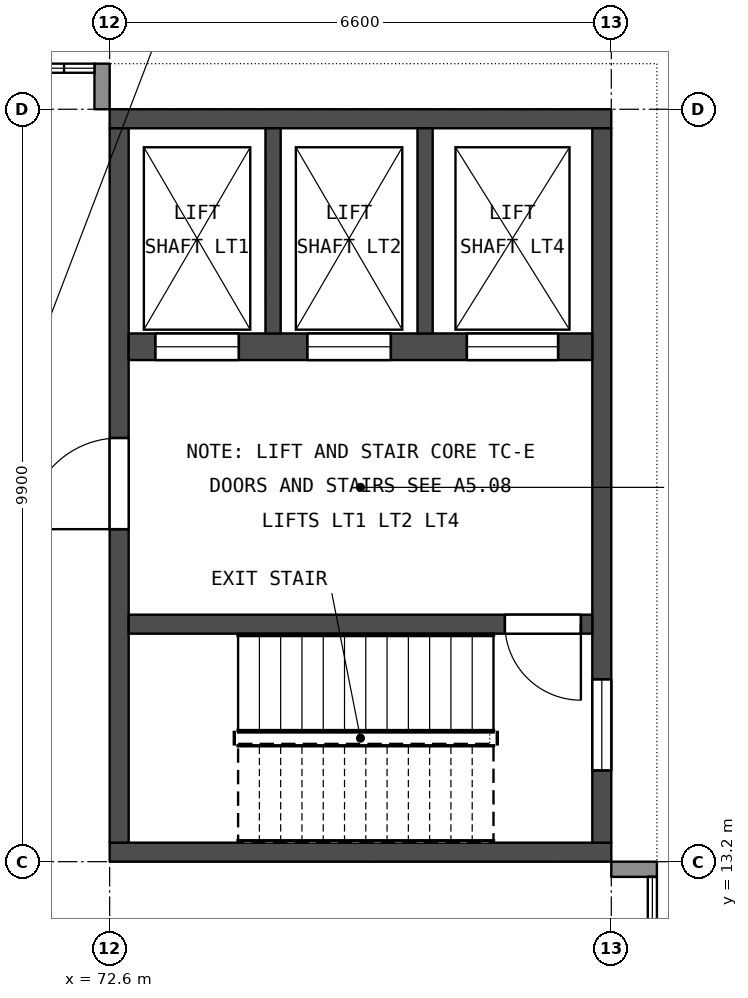
"""IFC4 building model, lengths in metres.
Left out: names, types, materials, properties, quantities, classifications, styles, units other than length and angle.
Written with IfcOpenShell. Run it as: python <this file> out.ifc"""

import sys

from ifc_helpers import new_model, si_unit, direction, frame, frame_2d, origin, place, context, subcontext, project, spatial, rectangle, extrude, element, fill, save


model = new_model("IFC4")
c1 = context("Model", 3, precision=1e-05, world=origin(), true_north=direction((0.0, 1.0)))
c2 = subcontext(c1, "Body", "Model", "MODEL_VIEW")
j1 = project(units=[si_unit("LENGTHUNIT", "METRE"), si_unit("PLANEANGLEUNIT", "RADIAN")], contexts=[c1])
p1 = place(None, origin())
s1 = spatial("IfcSite", under=j1, at=p1, CompositionType="ELEMENT")
p2 = place(p1, origin())
s2 = spatial("IfcBuilding", under=s1, at=p2, CompositionType="ELEMENT")
p3 = place(p2, frame((0.0, 0.0, 32.4)))
s3 = spatial("IfcBuildingStorey", under=s2, at=p3, CompositionType="ELEMENT", Elevation=32.4)
for number, where, z_axis, x_axis in (
    (1, (72.6, 13.325, 0.0), (0.0, 0.0, 1.0), (1.0, 0.0, 0.0)),
    (2, (72.6, 22.975, 0.0), (0.0, 0.0, 1.0), (1.0, 0.0, 0.0)),
):
    element("IfcWall", number, at=place(p3, frame(where, z_axis=z_axis, x_axis=x_axis)), inside=s3, PredefinedType="SHEAR", context=c2, shape_type="SweptSolid", body=[
        extrude(rectangle(XDim=6.6, YDim=0.25, at=frame_2d((3.3, 0.0))), origin(), (0.0, 0.0, 1.0), 4.2),
    ])
p4 = place(p3, frame((72.725, 13.45, 0.0), z_axis=(0.0, 0.0, 1.0), x_axis=(0.0, 1.0, 0.0)))
e3 = element("IfcWall", 3, at=p4, inside=s3, PredefinedType="SHEAR", context=c2, shape_type="SweptSolid", body=[
    extrude(rectangle(XDim=9.4, YDim=0.25, at=frame_2d((4.7, 0.0))), origin(), (0.0, 0.0, 1.0), 4.2),
])
p5 = place(p4, frame((4.125, 0.0, 0.0)))
e4 = element("IfcOpeningElement", 4, at=p5, cuts=e3, PredefinedType="OPENING", context=c2, shape_type="SweptSolid", body=[
    extrude(rectangle(XDim=1.2, YDim=2.1, at=frame_2d((0.6, 1.05))), frame((0.0, 0.135, 0.0), z_axis=(0.0, -1.0, 0.0), x_axis=(1.0, 0.0, 0.0)), (0.0, 0.0, 1.0), 0.27),
])
p6 = place(p3, frame((79.075, 13.45, 0.0), z_axis=(0.0, 0.0, 1.0), x_axis=(0.0, 1.0, 0.0)))
e5 = element("IfcWall", 5, at=p6, inside=s3, PredefinedType="SHEAR", context=c2, shape_type="SweptSolid", body=[
    extrude(rectangle(XDim=9.4, YDim=0.25, at=frame_2d((4.7, 0.0))), origin(), (0.0, 0.0, 1.0), 4.2),
])
p7 = place(p6, frame((0.95, 0.0, 0.7)))
e6 = element("IfcOpeningElement", 6, at=p7, cuts=e5, PredefinedType="OPENING", context=c2, shape_type="SweptSolid", body=[
    extrude(rectangle(XDim=1.2, YDim=1.8, at=frame_2d((0.6, 0.9))), frame((0.0, 0.135, 0.0), z_axis=(0.0, -1.0, 0.0), x_axis=(1.0, 0.0, 0.0)), (0.0, 0.0, 1.0), 0.27),
])
p8 = place(p3, frame((72.85, 16.325, 0.0), z_axis=(0.0, 0.0, 1.0), x_axis=(1.0, 0.0, 0.0)))
e7 = element("IfcWall", 7, at=p8, inside=s3, PredefinedType="SHEAR", context=c2, shape_type="SweptSolid", body=[
    extrude(rectangle(XDim=6.1, YDim=0.25, at=frame_2d((3.05, 0.0))), origin(), (0.0, 0.0, 1.0), 4.2),
])
p9 = place(p8, frame((4.95, 0.0, 0.0)))
e8 = element("IfcOpeningElement", 8, at=p9, cuts=e7, PredefinedType="OPENING", context=c2, shape_type="SweptSolid", body=[
    extrude(rectangle(XDim=1.0, YDim=2.2, at=frame_2d((0.5, 1.1))), frame((0.0, 0.135, 0.0), z_axis=(0.0, -1.0, 0.0), x_axis=(1.0, 0.0, 0.0)), (0.0, 0.0, 1.0), 0.27),
])
p10 = place(p3, frame((72.85, 19.975, 0.0), z_axis=(0.0, 0.0, 1.0), x_axis=(1.0, 0.0, 0.0)))
e9 = element("IfcWall", 9, at=p10, inside=s3, PredefinedType="SHEAR", context=c2, shape_type="SweptSolid", body=[
    extrude(rectangle(XDim=6.1, YDim=0.35, at=frame_2d((3.05, 0.0))), origin(), (0.0, 0.0, 1.0), 4.2),
])
p11 = place(p10, frame((0.35, 0.0, 0.0)))
e10 = element("IfcOpeningElement", 10, at=p11, cuts=e9, PredefinedType="OPENING", context=c2, shape_type="SweptSolid", body=[
    extrude(rectangle(XDim=1.1, YDim=2.2, at=frame_2d((0.55, 1.1))), frame((0.0, 0.185, 0.0), z_axis=(0.0, -1.0, 0.0), x_axis=(1.0, 0.0, 0.0)), (0.0, 0.0, 1.0), 0.37),
])
p12 = place(p10, frame((2.35, 0.0, 0.0)))
e11 = element("IfcOpeningElement", 11, at=p12, cuts=e9, PredefinedType="OPENING", context=c2, shape_type="SweptSolid", body=[
    extrude(rectangle(XDim=1.1, YDim=2.2, at=frame_2d((0.55, 1.1))), frame((0.0, 0.185, 0.0), z_axis=(0.0, -1.0, 0.0), x_axis=(1.0, 0.0, 0.0)), (0.0, 0.0, 1.0), 0.37),
])
p13 = place(p10, frame((4.45, 0.0, 0.0)))
e12 = element("IfcOpeningElement", 12, at=p13, cuts=e9, PredefinedType="OPENING", context=c2, shape_type="SweptSolid", body=[
    extrude(rectangle(XDim=1.2, YDim=2.3, at=frame_2d((0.6, 1.15))), frame((0.0, 0.185, 0.0), z_axis=(0.0, -1.0, 0.0), x_axis=(1.0, 0.0, 0.0)), (0.0, 0.0, 1.0), 0.37),
])
for number, where, z_axis, x_axis in (
    (13, (74.75, 20.15, 0.0), (0.0, 0.0, 1.0), (0.0, 1.0, 0.0)),
    (14, (76.75, 20.15, 0.0), (0.0, 0.0, 1.0), (0.0, 1.0, 0.0)),
):
    element("IfcWall", number, at=place(p3, frame(where, z_axis=z_axis, x_axis=x_axis)), inside=s3, PredefinedType="SHEAR", context=c2, shape_type="SweptSolid", body=[
        extrude(rectangle(XDim=2.7, YDim=0.2, at=frame_2d((1.35, 0.0))), origin(), (0.0, 0.0, 1.0), 4.2),
    ])
p14 = place(p3, frame((79.2, 13.1, 0.0), z_axis=(0.0, 0.0, 1.0), x_axis=(1.0, 0.0, 0.0)))
e15 = element("IfcWall", 15, at=p14, inside=s3, PredefinedType="STANDARD", context=c2, shape_type="SweptSolid", body=[
    extrude(rectangle(XDim=0.6, YDim=0.2, at=frame_2d((0.3, 0.0))), origin(), (0.0, 0.0, 1.0), 3.55),
])
p15 = place(p3, frame((72.5, 23.1, 0.0), z_axis=(0.0, 0.0, 1.0), x_axis=(0.0, 1.0, 0.0)))
e16 = element("IfcWall", 16, at=p15, inside=s3, PredefinedType="STANDARD", context=c2, shape_type="SweptSolid", body=[
    extrude(rectangle(XDim=0.6, YDim=0.2, at=frame_2d((0.3, 0.0))), origin(), (0.0, 0.0, 1.0), 3.55),
])
p16 = place(p5, origin())
e17 = element("IfcDoor", 17, at=p16, inside=s3, OperationType="SINGLE_SWING_LEFT", PredefinedType="DOOR", context=c2, shape_type="SweptSolid", body=[
    extrude(rectangle(XDim=1.2, YDim=2.1, at=frame_2d((0.6, 1.05))), frame((0.0, 0.025, 0.0), z_axis=(0.0, -1.0, 0.0), x_axis=(1.0, 0.0, 0.0)), (0.0, 0.0, 1.0), 0.05),
])
fill(e4, e17)
p17 = place(p9, origin())
e18 = element("IfcDoor", 18, at=p17, inside=s3, OperationType="SINGLE_SWING_RIGHT", PredefinedType="DOOR", context=c2, shape_type="SweptSolid", body=[
    extrude(rectangle(XDim=1.0, YDim=2.2, at=frame_2d((0.5, 1.1))), frame((0.0, 0.025, 0.0), z_axis=(0.0, -1.0, 0.0), x_axis=(1.0, 0.0, 0.0)), (0.0, 0.0, 1.0), 0.05),
])
fill(e8, e18)
p18 = place(p11, origin())
e19 = element("IfcDoor", 19, at=p18, inside=s3, OperationType="DOUBLE_DOOR_SLIDING", PredefinedType="NOTDEFINED", context=c2, shape_type="SweptSolid", body=[
    extrude(rectangle(XDim=1.1, YDim=2.2, at=frame_2d((0.55, 1.1))), frame((0.0, 0.025, 0.0), z_axis=(0.0, -1.0, 0.0), x_axis=(1.0, 0.0, 0.0)), (0.0, 0.0, 1.0), 0.05),
])
fill(e10, e19)
p19 = place(p12, origin())
e20 = element("IfcDoor", 20, at=p19, inside=s3, OperationType="DOUBLE_DOOR_SLIDING", PredefinedType="NOTDEFINED", context=c2, shape_type="SweptSolid", body=[
    extrude(rectangle(XDim=1.1, YDim=2.2, at=frame_2d((0.55, 1.1))), frame((0.0, 0.025, 0.0), z_axis=(0.0, -1.0, 0.0), x_axis=(1.0, 0.0, 0.0)), (0.0, 0.0, 1.0), 0.05),
])
fill(e11, e20)
p20 = place(p13, origin())
e21 = element("IfcDoor", 21, at=p20, inside=s3, OperationType="DOUBLE_DOOR_SLIDING", PredefinedType="NOTDEFINED", context=c2, shape_type="SweptSolid", body=[
    extrude(rectangle(XDim=1.2, YDim=2.3, at=frame_2d((0.6, 1.15))), frame((0.0, 0.025, 0.0), z_axis=(0.0, -1.0, 0.0), x_axis=(1.0, 0.0, 0.0)), (0.0, 0.0, 1.0), 0.05),
])
fill(e12, e21)
p21 = place(p7, origin())
e22 = element("IfcWindow", 22, at=p21, inside=s3, PartitioningType="SINGLE_PANEL", PredefinedType="WINDOW", context=c2, shape_type="SweptSolid", body=[
    extrude(rectangle(XDim=1.2, YDim=1.8, at=frame_2d((0.6, 0.9))), frame((0.0, 0.03, 0.0), z_axis=(0.0, -1.0, 0.0), x_axis=(1.0, 0.0, 0.0)), (0.0, 0.0, 1.0), 0.06),
])
fill(e6, e22)
save(model, sys.argv[1])
